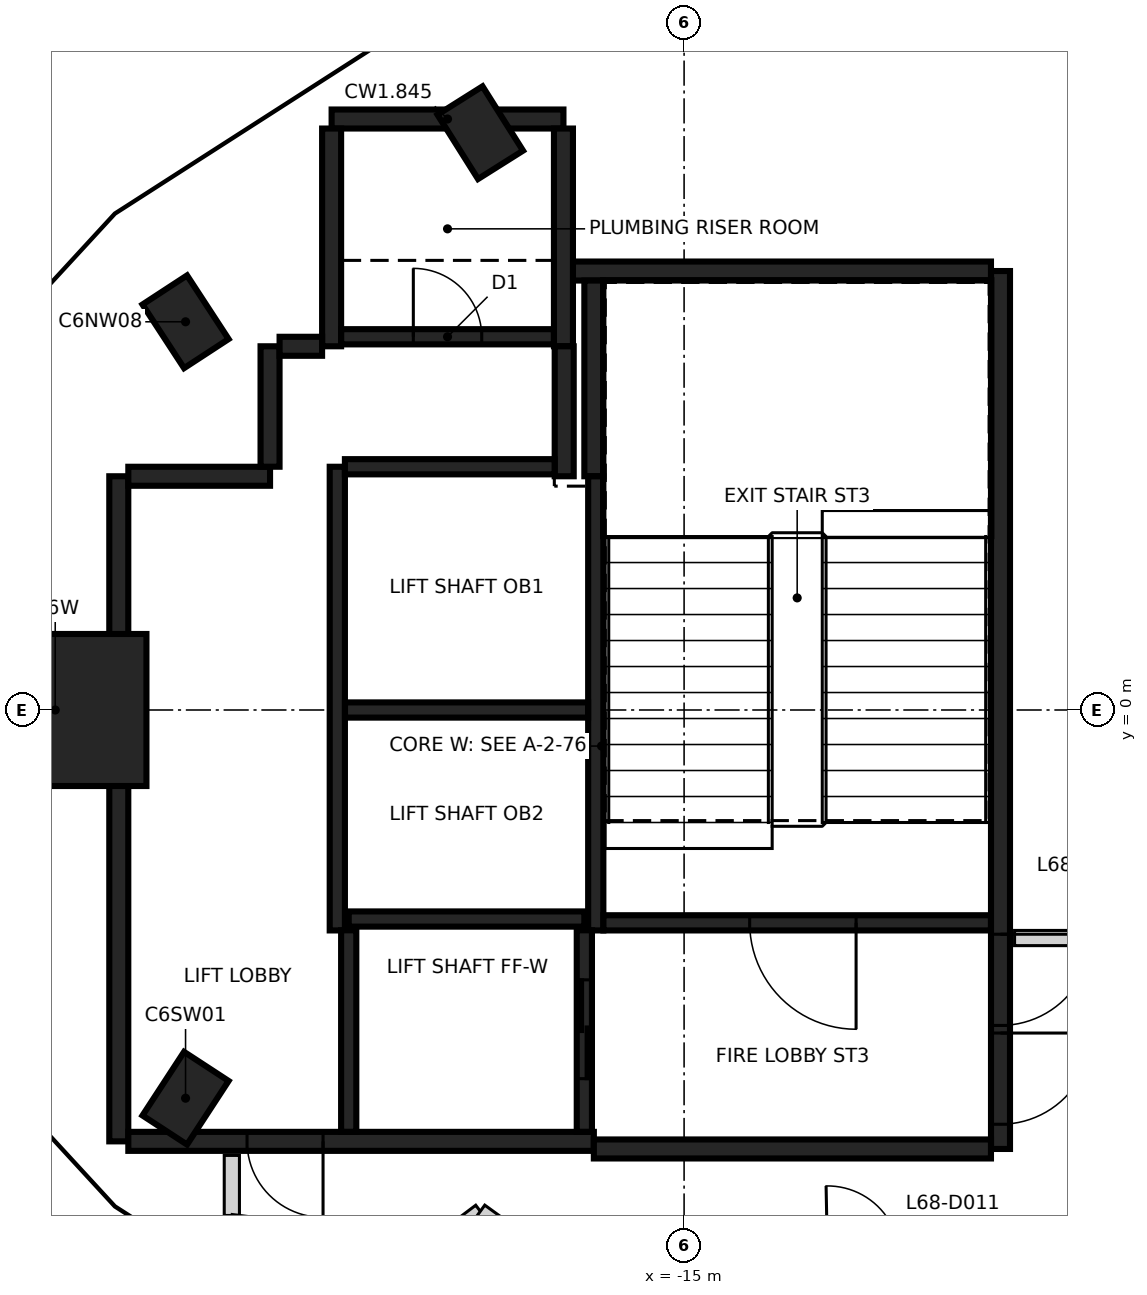
"""IFC4 building model, lengths in metres.
Left out: names, types, materials, properties, quantities, classifications, styles, units other than length and angle.
Written with IfcOpenShell. Run it as: python <this file> out.ifc"""

import sys

from ifc_helpers import new_model, si_unit, direction, frame, frame_2d, origin, origin_2d, place, context, subcontext, project, spatial, rectangle, extrude, element, fill, save


model = new_model("IFC4")
c1 = context("Model", 3, precision=1e-05, world=origin(), true_north=direction((0.0, 1.0)))
c2 = subcontext(c1, "Body", "Model", "MODEL_VIEW")
j1 = project(units=[si_unit("LENGTHUNIT", "METRE"), si_unit("PLANEANGLEUNIT", "RADIAN")], contexts=[c1])
p1 = place(None, origin())
s1 = spatial("IfcSite", under=j1, at=p1, CompositionType="ELEMENT")
p2 = place(p1, origin())
s2 = spatial("IfcBuilding", under=s1, at=p2, CompositionType="ELEMENT")
p3 = place(p2, frame((0.0, 0.0, 269.4)))
s3 = spatial("IfcBuildingStorey", under=s2, at=p3, CompositionType="ELEMENT", Elevation=269.4)
for number, where, z_axis, x_axis in (
    (1, (-17.681, 7.595, -0.35), (0.0, 0.0, 1.0), (-0.533, 0.846, 0.0)),
    (2, (-21.559, 5.107, -0.35), (0.0, 0.0, 1.0), (-0.547, 0.837, 0.0)),
    (3, (-21.559, -5.107, -0.35), (0.0, 0.0, 1.0), (0.547, 0.837, 0.0)),
):
    element("IfcColumn", number, at=place(p3, frame(where, z_axis=z_axis, x_axis=x_axis)), inside=s3, PredefinedType="COLUMN", context=c2, shape_type="SweptSolid", body=[
        extrude(rectangle(XDim=1.0, YDim=0.7, at=origin_2d()), origin(), (0.0, 0.0, 1.0), 3.6),
    ])
p4 = place(p3, frame((-23.273, 0.0, -0.35), z_axis=(0.0, 0.0, 1.0), x_axis=(1.0, 0.0, 0.0)))
e4 = element("IfcColumn", 4, at=p4, inside=s3, PredefinedType="COLUMN", context=c2, shape_type="SweptSolid", body=[
    extrude(rectangle(XDim=2.4, YDim=2.0, at=origin_2d()), origin(), (0.0, 0.0, 1.0), 3.6),
])
p5 = place(p3, frame((-10.837, 5.775, 0.0), z_axis=(0.0, 0.0, 1.0), x_axis=(0.0, -1.0, 0.0)))
e5 = element("IfcWall", 5, at=p5, inside=s3, PredefinedType="SHEAR", context=c2, shape_type="SweptSolid", body=[
    extrude(rectangle(XDim=11.55, YDim=0.25, at=frame_2d((5.775, 0.0))), origin(), (0.0, 0.0, 1.0), 3.25),
])
p6 = place(p5, frame((10.025, 0.0, 0.0)))
e6 = element("IfcOpeningElement", 6, at=p6, cuts=e5, PredefinedType="OPENING", context=c2, shape_type="SweptSolid", body=[
    extrude(rectangle(XDim=1.2, YDim=2.1, at=frame_2d((0.6, 1.05))), frame((0.0, 0.135, 0.0), z_axis=(0.0, -1.0, 0.0), x_axis=(1.0, 0.0, 0.0)), (0.0, 0.0, 1.0), 0.27),
])
p7 = place(p5, frame((8.725, 0.0, 0.0)))
e7 = element("IfcOpeningElement", 7, at=p7, cuts=e5, PredefinedType="OPENING", context=c2, shape_type="SweptSolid", body=[
    extrude(rectangle(XDim=1.2, YDim=2.1, at=frame_2d((0.6, 1.05))), frame((0.0, 0.135, 0.0), z_axis=(0.0, -1.0, 0.0), x_axis=(1.0, 0.0, 0.0)), (0.0, 0.0, 1.0), 0.27),
])
p8 = place(p3, frame((-22.437, -5.675, 0.0), z_axis=(0.0, 0.0, 1.0), x_axis=(0.0, 1.0, 0.0)))
e8 = element("IfcWall", 8, at=p8, inside=s3, PredefinedType="SHEAR", context=c2, shape_type="SweptSolid", body=[
    extrude(rectangle(XDim=8.75, YDim=0.25, at=frame_2d((4.375, 0.0))), origin(), (0.0, 0.0, 1.0), 3.25),
])
p9 = place(p3, frame((-16.187, -5.675, 0.0), z_axis=(0.0, 0.0, 1.0), x_axis=(-1.0, 0.0, 0.0)))
e9 = element("IfcWall", 9, at=p9, inside=s3, PredefinedType="SHEAR", context=c2, shape_type="SweptSolid", body=[
    extrude(rectangle(XDim=6.125, YDim=0.25, at=frame_2d((3.062, 0.0))), origin(), (0.0, 0.0, 1.0), 3.25),
])
p10 = place(p9, frame((3.563, 0.0, 0.0)))
e10 = element("IfcOpeningElement", 10, at=p10, cuts=e9, PredefinedType="OPENING", context=c2, shape_type="SweptSolid", body=[
    extrude(rectangle(XDim=1.0, YDim=2.1, at=frame_2d((0.5, 1.05))), frame((0.0, 0.135, 0.0), z_axis=(0.0, -1.0, 0.0), x_axis=(1.0, 0.0, 0.0)), (0.0, 0.0, 1.0), 0.27),
])
p11 = place(p3, frame((-10.963, -5.775, 0.0), z_axis=(0.0, 0.0, 1.0), x_axis=(-1.0, 0.0, 0.0)))
e11 = element("IfcWall", 11, at=p11, inside=s3, PredefinedType="SHEAR", context=c2, shape_type="SweptSolid", body=[
    extrude(rectangle(XDim=5.225, YDim=0.25, at=frame_2d((2.612, 0.0))), origin(), (0.0, 0.0, 1.0), 3.25),
])
p12 = place(p3, frame((-16.472, 5.775, 0.0), z_axis=(0.0, 0.0, 1.0), x_axis=(1.0, 0.0, 0.0)))
e12 = element("IfcWall", 12, at=p12, inside=s3, PredefinedType="SHEAR", context=c2, shape_type="SweptSolid", body=[
    extrude(rectangle(XDim=5.51, YDim=0.25, at=frame_2d((2.755, 0.0))), origin(), (0.0, 0.0, 1.0), 3.25),
])
p13 = place(p3, frame((-19.637, 7.775, 0.0), z_axis=(0.0, 0.0, 1.0), x_axis=(1.0, 0.0, 0.0)))
e13 = element("IfcWall", 13, at=p13, inside=s3, PredefinedType="SHEAR", context=c2, shape_type="SweptSolid", body=[
    extrude(rectangle(XDim=3.05, YDim=0.25, at=frame_2d((1.525, 0.0))), origin(), (0.0, 0.0, 1.0), 3.25),
])
for number, where, z_axis, x_axis in (
    (14, (-16.587, 7.65, 0.0), (0.0, 0.0, 1.0), (0.0, -1.0, 0.0)),
    (15, (-19.637, 4.785, 0.0), (0.0, 0.0, 1.0), (0.0, 1.0, 0.0)),
):
    element("IfcWall", number, at=place(p3, frame(where, z_axis=z_axis, x_axis=x_axis)), inside=s3, PredefinedType="SHEAR", context=c2, shape_type="SweptSolid", body=[
        extrude(rectangle(XDim=2.865, YDim=0.25, at=frame_2d((1.432, 0.0))), origin(), (0.0, 0.0, 1.0), 3.25),
    ])
p14 = place(p3, frame((-16.187, 3.075, 0.0), z_axis=(0.0, 0.0, 1.0), x_axis=(0.0, 1.0, 0.0)))
e16 = element("IfcWall", 16, at=p14, inside=s3, PredefinedType="SHEAR", context=c2, shape_type="SweptSolid", body=[
    extrude(rectangle(XDim=2.575, YDim=0.25, at=frame_2d((1.287, 0.0))), origin(), (0.0, 0.0, 1.0), 3.25),
])
p15 = place(p3, frame((-22.312, 3.075, 0.0), z_axis=(0.0, 0.0, 1.0), x_axis=(1.0, 0.0, 0.0)))
e17 = element("IfcWall", 17, at=p15, inside=s3, PredefinedType="SHEAR", context=c2, shape_type="SweptSolid", body=[
    extrude(rectangle(XDim=1.865, YDim=0.25, at=frame_2d((0.932, 0.0))), origin(), (0.0, 0.0, 1.0), 3.25),
])
p16 = place(p3, frame((-16.577, 4.785, 0.0), z_axis=(0.0, 0.0, 1.0), x_axis=(0.0, -1.0, 0.0)))
e18 = element("IfcWall", 18, at=p16, inside=s3, PredefinedType="SHEAR", context=c2, shape_type="SweptSolid", body=[
    extrude(rectangle(XDim=1.71, YDim=0.25, at=frame_2d((0.855, 0.0))), origin(), (0.0, 0.0, 1.0), 3.25),
])
p17 = place(p3, frame((-20.447, 3.2, 0.0), z_axis=(0.0, 0.0, 1.0), x_axis=(0.0, 1.0, 0.0)))
e19 = element("IfcWall", 19, at=p17, inside=s3, PredefinedType="SHEAR", context=c2, shape_type="SweptSolid", body=[
    extrude(rectangle(XDim=1.584, YDim=0.25, at=frame_2d((0.792, 0.0))), origin(), (0.0, 0.0, 1.0), 3.25),
])
p18 = place(p3, frame((-20.322, 4.785, 0.0), z_axis=(0.0, 0.0, 1.0), x_axis=(1.0, 0.0, 0.0)))
e20 = element("IfcWall", 20, at=p18, inside=s3, PredefinedType="SHEAR", context=c2, shape_type="SweptSolid", body=[
    extrude(rectangle(XDim=0.559, YDim=0.25, at=frame_2d((0.28, 0.0))), origin(), (0.0, 0.0, 1.0), 3.25),
])
p19 = place(p3, frame((-16.162, 3.074, 0.0), z_axis=(0.0, 0.0, 1.0), x_axis=(0.0, -1.0, 0.0)))
e21 = element("IfcWall", 21, at=p19, inside=s3, PredefinedType="SHEAR", context=c2, shape_type="SweptSolid", body=[
    extrude(rectangle(XDim=5.974, YDim=0.2, at=frame_2d((2.987, 0.0))), origin(), (0.0, 0.0, 1.0), 3.25),
])
p20 = place(p3, frame((-19.562, -2.9, 0.0), z_axis=(0.0, 0.0, 1.0), x_axis=(0.0, 1.0, 0.0)))
e22 = element("IfcWall", 22, at=p20, inside=s3, PredefinedType="SHEAR", context=c2, shape_type="SweptSolid", body=[
    extrude(rectangle(XDim=6.1, YDim=0.2, at=frame_2d((3.05, 0.0))), origin(), (0.0, 0.0, 1.0), 3.25),
])
p21 = place(p3, frame((-10.963, -2.8, 0.0), z_axis=(0.0, 0.0, 1.0), x_axis=(-1.0, 0.0, 0.0)))
e23 = element("IfcWall", 23, at=p21, inside=s3, PredefinedType="SHEAR", context=c2, shape_type="SweptSolid", body=[
    extrude(rectangle(XDim=5.098, YDim=0.2, at=frame_2d((2.549, 0.0))), origin(), (0.0, 0.0, 1.0), 3.25),
])
p22 = place(p21, frame((1.774, 0.0, 0.0)))
e24 = element("IfcOpeningElement", 24, at=p22, cuts=e23, PredefinedType="OPENING", context=c2, shape_type="SweptSolid", body=[
    extrude(rectangle(XDim=1.4, YDim=2.1, at=frame_2d((0.7, 1.05))), frame((0.0, 0.11, 0.0), z_axis=(0.0, -1.0, 0.0), x_axis=(1.0, 0.0, 0.0)), (0.0, 0.0, 1.0), 0.22),
])
p23 = place(p3, frame((-16.263, 0.0, 0.0), z_axis=(0.0, 0.0, 1.0), x_axis=(-1.0, 0.0, 0.0)))
e25 = element("IfcWall", 25, at=p23, inside=s3, PredefinedType="SHEAR", context=c2, shape_type="SweptSolid", body=[
    extrude(rectangle(XDim=3.198, YDim=0.2, at=frame_2d((1.599, 0.0))), origin(), (0.0, 0.0, 1.0), 3.25),
])
p24 = place(p3, frame((-19.511, 4.91, 0.0), z_axis=(0.0, 0.0, 1.0), x_axis=(1.0, 0.0, 0.0)))
e26 = element("IfcWall", 26, at=p24, inside=s3, PredefinedType="SHEAR", context=c2, shape_type="SweptSolid", body=[
    extrude(rectangle(XDim=2.798, YDim=0.2, at=frame_2d((1.399, 0.0))), origin(), (0.0, 0.0, 1.0), 3.25),
])
p25 = place(p24, frame((0.949, 0.0, 0.0)))
e27 = element("IfcOpeningElement", 27, at=p25, cuts=e26, PredefinedType="OPENING", context=c2, shape_type="SweptSolid", body=[
    extrude(rectangle(XDim=0.9, YDim=2.1, at=frame_2d((0.45, 1.05))), frame((0.0, 0.11, 0.0), z_axis=(0.0, -1.0, 0.0), x_axis=(1.0, 0.0, 0.0)), (0.0, 0.0, 1.0), 0.22),
])
p26 = place(p3, frame((-19.462, 3.2, 0.0), z_axis=(0.0, 0.0, 1.0), x_axis=(1.0, 0.0, 0.0)))
e28 = element("IfcWall", 28, at=p26, inside=s3, PredefinedType="SHEAR", context=c2, shape_type="SweptSolid", body=[
    extrude(rectangle(XDim=2.759, YDim=0.2, at=frame_2d((1.379, 0.0))), origin(), (0.0, 0.0, 1.0), 3.25),
])
p27 = place(p3, frame((-19.412, -2.75, 0.0), z_axis=(0.0, 0.0, 1.0), x_axis=(1.0, 0.0, 0.0)))
e29 = element("IfcWall", 29, at=p27, inside=s3, PredefinedType="SHEAR", context=c2, shape_type="SweptSolid", body=[
    extrude(rectangle(XDim=3.1, YDim=0.2, at=frame_2d((1.55, 0.0))), origin(), (0.0, 0.0, 1.0), 3.25),
])
p28 = place(p3, frame((-16.312, -2.898, 0.0), z_axis=(0.0, 0.0, 1.0), x_axis=(0.0, -1.0, 0.0)))
e30 = element("IfcWall", 30, at=p28, inside=s3, PredefinedType="SHEAR", context=c2, shape_type="SweptSolid", body=[
    extrude(rectangle(XDim=2.651, YDim=0.2, at=frame_2d((1.325, 0.0))), origin(), (0.0, 0.0, 1.0), 3.25),
])
p29 = place(p28, frame((0.652, 0.0, 0.0)))
e31 = element("IfcOpeningElement", 31, at=p29, cuts=e30, PredefinedType="OPENING", context=c2, shape_type="SweptSolid", body=[
    extrude(rectangle(XDim=1.3, YDim=2.1, at=frame_2d((0.65, 1.05))), frame((0.0, 0.11, 0.0), z_axis=(0.0, -1.0, 0.0), x_axis=(1.0, 0.0, 0.0)), (0.0, 0.0, 1.0), 0.22),
])
p30 = place(p3, frame((-19.412, -5.549, 0.0), z_axis=(0.0, 0.0, 1.0), x_axis=(0.0, 1.0, 0.0)))
e32 = element("IfcWall", 32, at=p30, inside=s3, PredefinedType="SHEAR", context=c2, shape_type="SweptSolid", body=[
    extrude(rectangle(XDim=2.651, YDim=0.2, at=frame_2d((1.325, 0.0))), origin(), (0.0, 0.0, 1.0), 3.25),
])
p31 = place(p3, frame((-20.95, -6.65, 0.0), z_axis=(0.0, 0.0, 1.0), x_axis=(0.0, 1.0, 0.0)))
e33 = element("IfcWall", 33, at=p31, inside=s3, PredefinedType="PARTITIONING", context=c2, shape_type="SweptSolid", body=[
    extrude(rectangle(XDim=0.79, YDim=0.2, at=frame_2d((0.395, 0.0))), origin(), (0.0, 0.0, 1.0), 3.25),
])
p32 = place(p3, frame((-20.929, -7.306, 0.0), z_axis=(0.0, 0.0, 1.0), x_axis=(0.125534186853, 0.992089294334, 0.0)))
e34 = element("IfcWall", 34, at=p32, inside=s3, PredefinedType="PARTITIONING", context=c2, shape_type="SweptSolid", body=[
    extrude(rectangle(XDim=0.661, YDim=0.2, at=frame_2d((0.331, 0.0))), origin(), (0.0, 0.0, 1.0), 3.25),
])
p33 = place(p3, frame((-18.642, -7.319, 0.0), z_axis=(0.0, 0.0, 1.0), x_axis=(0.798707882989, 0.601718968998, 0.0)))
e35 = element("IfcWall", 35, at=p33, inside=s3, PredefinedType="PARTITIONING", context=c2, shape_type="SweptSolid", body=[
    extrude(rectangle(XDim=1.203, YDim=0.2, at=frame_2d((0.602, 0.0))), origin(), (0.0, 0.0, 1.0), 2.35),
])
p34 = place(p3, frame((-17.681, -6.595, 0.0), z_axis=(0.0, 0.0, 1.0), x_axis=(0.810123213102, -0.586259652026, 0.0)))
e36 = element("IfcWall", 36, at=p34, inside=s3, PredefinedType="PARTITIONING", context=c2, shape_type="SweptSolid", body=[
    extrude(rectangle(XDim=1.17, YDim=0.2, at=frame_2d((0.585, 0.0))), origin(), (0.0, 0.0, 1.0), 3.25),
])
p35 = place(p3, frame((-10.652, -3.0, 0.0), z_axis=(0.0, 0.0, 1.0), x_axis=(1.0, 0.0, 0.0)))
e37 = element("IfcWall", 37, at=p35, inside=s3, PredefinedType="PARTITIONING", context=c2, shape_type="SweptSolid", body=[
    extrude(rectangle(XDim=0.994, YDim=0.2, at=frame_2d((0.497, 0.0))), origin(), (0.0, 0.0, 1.0), 3.25),
])
p36 = place(p3, frame((-10.023, -7.151, 0.0), z_axis=(0.0, 0.0, 1.0), x_axis=(0.668886243279, 0.743364778256, 0.0)))
e38 = element("IfcWall", 38, at=p36, inside=s3, PredefinedType="PARTITIONING", context=c2, shape_type="SweptSolid", body=[
    extrude(rectangle(XDim=3.609, YDim=0.2, at=frame_2d((1.805, 0.0))), origin(), (0.0, 0.0, 1.0), 3.25),
])
p37 = place(p29, origin())
e39 = element("IfcDoor", 39, at=p37, inside=s3, OperationType="SLIDING_TO_LEFT", PredefinedType="DOOR", context=c2, shape_type="SweptSolid", body=[
    extrude(rectangle(XDim=1.3, YDim=2.1, at=frame_2d((0.65, 1.05))), frame((0.0, 0.025, 0.0), z_axis=(0.0, -1.0, 0.0), x_axis=(1.0, 0.0, 0.0)), (0.0, 0.0, 1.0), 0.05),
])
fill(e31, e39)
p38 = place(p10, origin())
e40 = element("IfcDoor", 40, at=p38, inside=s3, OperationType="SINGLE_SWING_LEFT", PredefinedType="DOOR", context=c2, shape_type="SweptSolid", body=[
    extrude(rectangle(XDim=1.0, YDim=2.1, at=frame_2d((0.5, 1.05))), frame((0.0, 0.025, 0.0), z_axis=(0.0, -1.0, 0.0), x_axis=(1.0, 0.0, 0.0)), (0.0, 0.0, 1.0), 0.05),
])
fill(e10, e40)
p39 = place(p6, origin())
e41 = element("IfcDoor", 41, at=p39, inside=s3, OperationType="SINGLE_SWING_LEFT", PredefinedType="DOOR", context=c2, shape_type="SweptSolid", body=[
    extrude(rectangle(XDim=1.2, YDim=2.1, at=frame_2d((0.6, 1.05))), frame((0.0, 0.025, 0.0), z_axis=(0.0, -1.0, 0.0), x_axis=(1.0, 0.0, 0.0)), (0.0, 0.0, 1.0), 0.05),
])
fill(e6, e41)
p40 = place(p7, origin())
e42 = element("IfcDoor", 42, at=p40, inside=s3, OperationType="SINGLE_SWING_RIGHT", PredefinedType="DOOR", context=c2, shape_type="SweptSolid", body=[
    extrude(rectangle(XDim=1.2, YDim=2.1, at=frame_2d((0.6, 1.05))), frame((0.0, 0.025, 0.0), z_axis=(0.0, -1.0, 0.0), x_axis=(1.0, 0.0, 0.0)), (0.0, 0.0, 1.0), 0.05),
])
fill(e7, e42)
p41 = place(p22, origin())
e43 = element("IfcDoor", 43, at=p41, inside=s3, OperationType="SINGLE_SWING_LEFT", PredefinedType="DOOR", context=c2, shape_type="SweptSolid", body=[
    extrude(rectangle(XDim=1.4, YDim=2.1, at=frame_2d((0.7, 1.05))), frame((0.0, 0.025, 0.0), z_axis=(0.0, -1.0, 0.0), x_axis=(1.0, 0.0, 0.0)), (0.0, 0.0, 1.0), 0.05),
])
fill(e24, e43)
p42 = place(p25, origin())
e44 = element("IfcDoor", 44, at=p42, inside=s3, OperationType="SINGLE_SWING_RIGHT", PredefinedType="DOOR", context=c2, shape_type="SweptSolid", body=[
    extrude(rectangle(XDim=0.9, YDim=2.1, at=frame_2d((0.45, 1.05))), frame((0.0, 0.025, 0.0), z_axis=(0.0, -1.0, 0.0), x_axis=(1.0, 0.0, 0.0)), (0.0, 0.0, 1.0), 0.05),
])
fill(e27, e44)
save(model, sys.argv[1])
